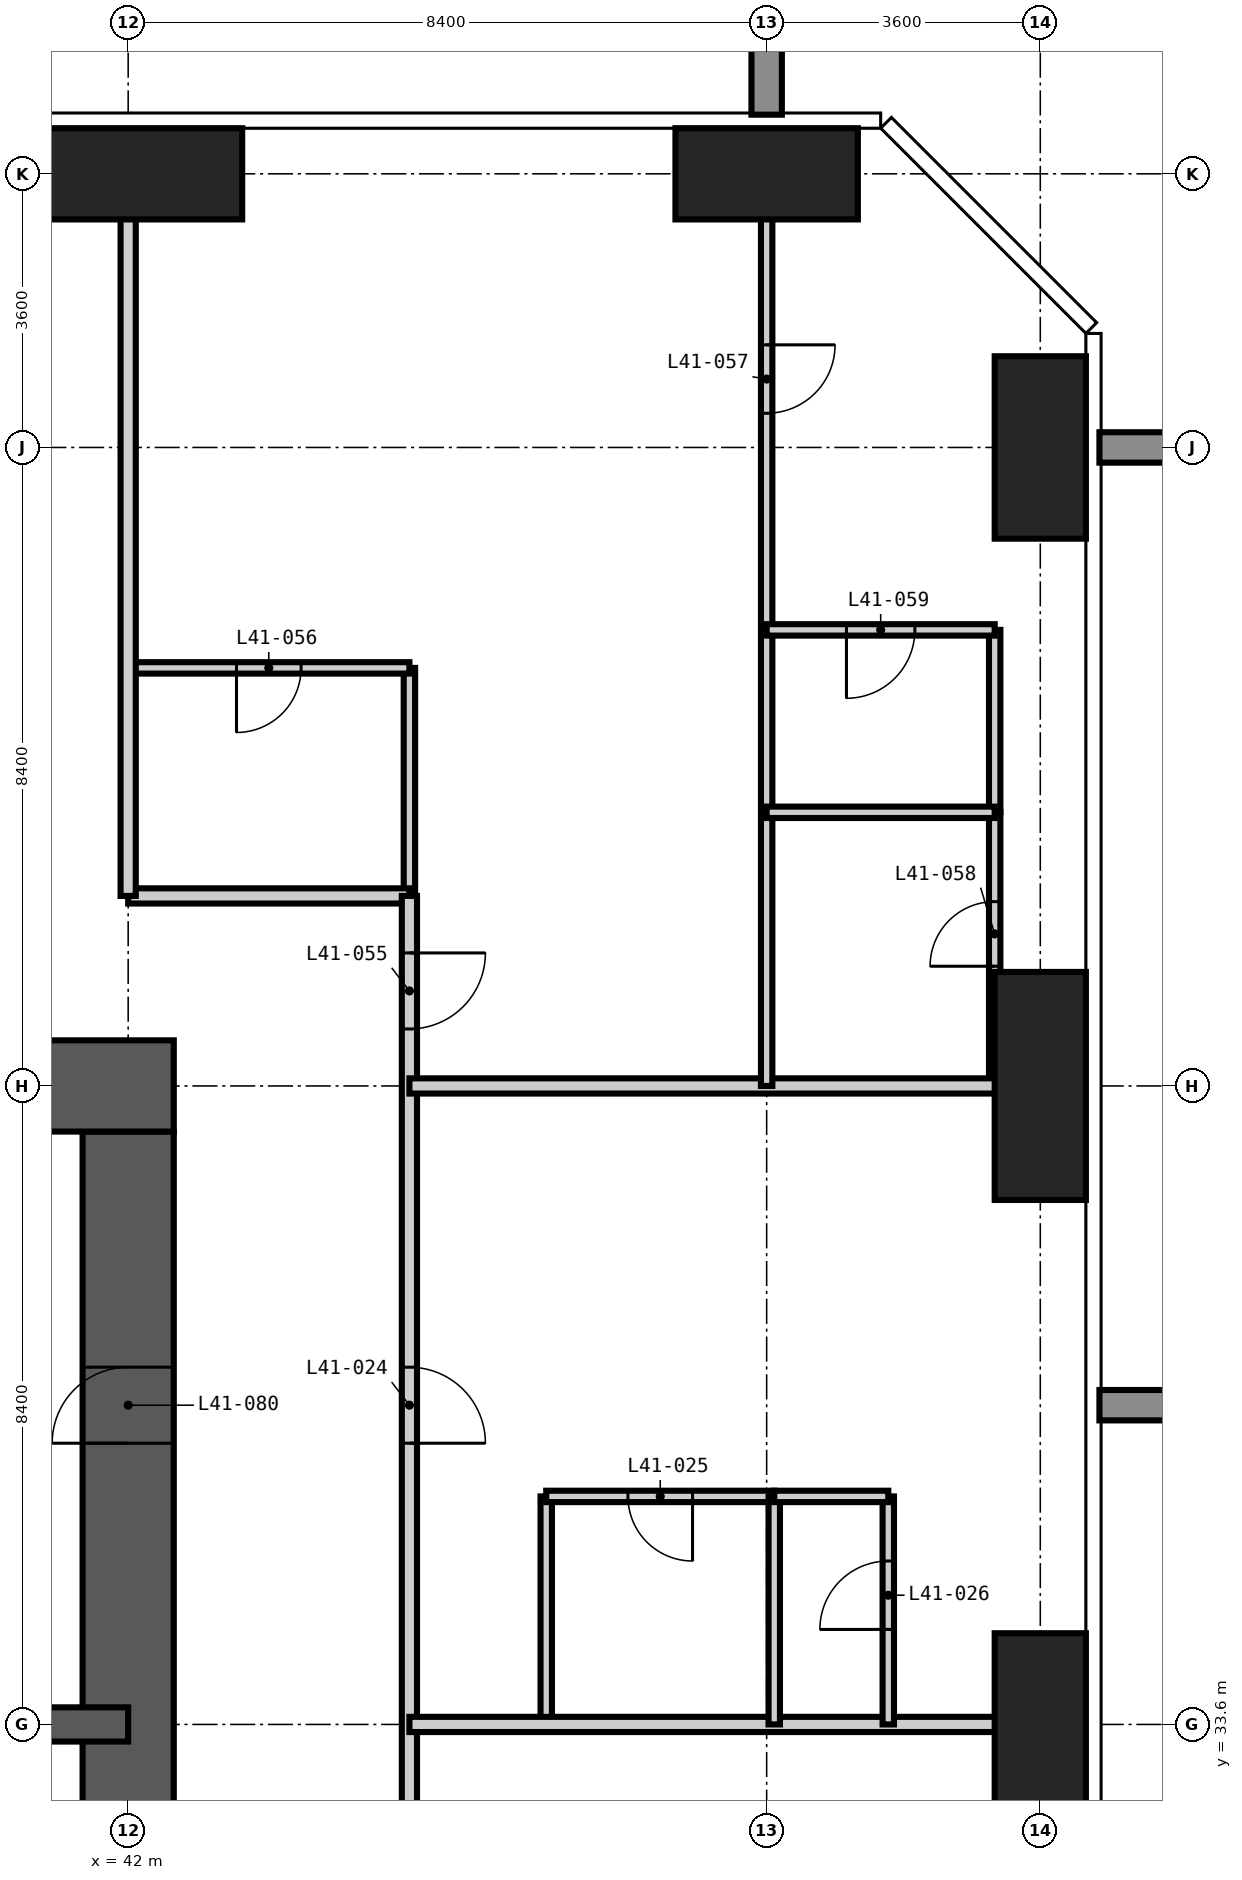
"""IFC4 building model, lengths in metres.
Left out: names, types, materials, properties, quantities, classifications, styles, units other than length and angle.
Written with IfcOpenShell. Run it as: python <this file> out.ifc"""

import sys

from ifc_helpers import new_model, si_unit, direction, frame, frame_2d, origin, origin_2d, place, context, subcontext, project, spatial, rectangle, extrude, element, fill, save


model = new_model("IFC4")
c1 = context("Model", 3, precision=1e-05, world=origin(), true_north=direction((0.0, 1.0)))
c2 = subcontext(c1, "Body", "Model", "MODEL_VIEW")
j1 = project(units=[si_unit("LENGTHUNIT", "METRE"), si_unit("PLANEANGLEUNIT", "RADIAN")], contexts=[c1])
p1 = place(None, origin())
s1 = spatial("IfcSite", under=j1, at=p1, CompositionType="ELEMENT")
p2 = place(p1, origin())
s2 = spatial("IfcBuilding", under=s1, at=p2, CompositionType="ELEMENT")
p3 = place(p2, frame((0.0, 0.0, 162.6)))
s3 = spatial("IfcBuildingStorey", under=s2, at=p3, CompositionType="ELEMENT", Elevation=162.6)
p4 = place(p3, frame((42.0, 54.0, -0.35), z_axis=(0.0, 0.0, 1.0), x_axis=(1.0, 0.0, 0.0)))
e1 = element("IfcColumn", 1, at=p4, inside=s3, PredefinedType="COLUMN", context=c2, shape_type="SweptSolid", body=[
    extrude(rectangle(XDim=3.0, YDim=1.2, at=origin_2d()), origin(), (0.0, 0.0, 1.0), 3.6),
])
p5 = place(p3, frame((50.4, 54.0, -0.35), z_axis=(0.0, 0.0, 1.0), x_axis=(1.0, 0.0, 0.0)))
e2 = element("IfcColumn", 2, at=p5, inside=s3, PredefinedType="COLUMN", context=c2, shape_type="SweptSolid", body=[
    extrude(rectangle(XDim=2.4, YDim=1.2, at=origin_2d()), origin(), (0.0, 0.0, 1.0), 3.6),
])
p6 = place(p3, frame((54.0, 33.6, -0.35), z_axis=(0.0, 0.0, 1.0), x_axis=(1.0, 0.0, 0.0)))
e3 = element("IfcColumn", 3, at=p6, inside=s3, PredefinedType="COLUMN", context=c2, shape_type="SweptSolid", body=[
    extrude(rectangle(XDim=1.2, YDim=2.4, at=origin_2d()), origin(), (0.0, 0.0, 1.0), 3.6),
])
p7 = place(p3, frame((54.0, 42.0, -0.35), z_axis=(0.0, 0.0, 1.0), x_axis=(1.0, 0.0, 0.0)))
e4 = element("IfcColumn", 4, at=p7, inside=s3, PredefinedType="COLUMN", context=c2, shape_type="SweptSolid", body=[
    extrude(rectangle(XDim=1.2, YDim=3.0, at=origin_2d()), origin(), (0.0, 0.0, 1.0), 3.6),
])
p8 = place(p3, frame((54.0, 50.4, -0.35), z_axis=(0.0, 0.0, 1.0), x_axis=(1.0, 0.0, 0.0)))
e5 = element("IfcColumn", 5, at=p8, inside=s3, PredefinedType="COLUMN", context=c2, shape_type="SweptSolid", body=[
    extrude(rectangle(XDim=1.2, YDim=2.4, at=origin_2d()), origin(), (0.0, 0.0, 1.0), 3.6),
])
p9 = place(p3, frame((42.0, 17.4, -0.35), z_axis=(0.0, 0.0, 1.0), x_axis=(0.0, 1.0, 0.0)))
e6 = element("IfcWall", 6, at=p9, inside=s3, PredefinedType="SHEAR", context=c2, shape_type="SweptSolid", body=[
    extrude(rectangle(XDim=24.0, YDim=1.2, at=frame_2d((12.0, 0.0))), origin(), (0.0, 0.0, 1.0), 3.6),
])
p10 = place(p9, frame((0.2, 0.0, 0.35)))
e7 = element("IfcOpeningElement", 7, at=p10, cuts=e6, PredefinedType="OPENING", context=c2, shape_type="SweptSolid", body=[
    extrude(rectangle(XDim=1.2, YDim=2.2, at=frame_2d((0.6, 1.1))), frame((0.0, 0.61, 0.0), z_axis=(0.0, -1.0, 0.0), x_axis=(1.0, 0.0, 0.0)), (0.0, 0.0, 1.0), 1.22),
])
p11 = place(p9, frame((11.5, 0.0, 0.35)))
e8 = element("IfcOpeningElement", 8, at=p11, cuts=e6, PredefinedType="OPENING", context=c2, shape_type="SweptSolid", body=[
    extrude(rectangle(XDim=1.0, YDim=2.1, at=frame_2d((0.5, 1.05))), frame((0.0, 0.61, 0.0), z_axis=(0.0, -1.0, 0.0), x_axis=(1.0, 0.0, 0.0)), (0.0, 0.0, 1.0), 1.22),
])
p12 = place(p9, frame((19.9, 0.0, 0.35)))
e9 = element("IfcOpeningElement", 9, at=p12, cuts=e6, PredefinedType="OPENING", context=c2, shape_type="SweptSolid", body=[
    extrude(rectangle(XDim=1.0, YDim=2.1, at=frame_2d((0.5, 1.05))), frame((0.0, 0.61, 0.0), z_axis=(0.0, -1.0, 0.0), x_axis=(1.0, 0.0, 0.0)), (0.0, 0.0, 1.0), 1.22),
])
p13 = place(p3, frame((42.6, 42.0, -0.35), z_axis=(0.0, 0.0, 1.0), x_axis=(-1.0, 0.0, 0.0)))
e10 = element("IfcWall", 10, at=p13, inside=s3, PredefinedType="SHEAR", context=c2, shape_type="SweptSolid", body=[
    extrude(rectangle(XDim=26.4, YDim=1.2, at=frame_2d((13.2, 0.0))), origin(), (0.0, 0.0, 1.0), 3.6),
])
p14 = place(p13, frame((21.1, 0.0, 0.35)))
e11 = element("IfcOpeningElement", 11, at=p14, cuts=e10, PredefinedType="OPENING", context=c2, shape_type="SweptSolid", body=[
    extrude(rectangle(XDim=1.0, YDim=2.1, at=frame_2d((0.5, 1.05))), frame((0.0, 0.61, 0.0), z_axis=(0.0, -1.0, 0.0), x_axis=(1.0, 0.0, 0.0)), (0.0, 0.0, 1.0), 1.22),
])
p15 = place(p13, frame((10.5, 0.0, 0.35)))
e12 = element("IfcOpeningElement", 12, at=p15, cuts=e10, PredefinedType="OPENING", context=c2, shape_type="SweptSolid", body=[
    extrude(rectangle(XDim=1.2, YDim=2.2, at=frame_2d((0.6, 1.1))), frame((0.0, 0.61, 0.0), z_axis=(0.0, -1.0, 0.0), x_axis=(1.0, 0.0, 0.0)), (0.0, 0.0, 1.0), 1.22),
])
p16 = place(p3, frame((16.8, 33.6, -0.35), z_axis=(0.0, 0.0, 1.0), x_axis=(1.0, 0.0, 0.0)))
e13 = element("IfcWall", 13, at=p16, inside=s3, PredefinedType="SHEAR", context=c2, shape_type="SweptSolid", body=[
    extrude(rectangle(XDim=25.2, YDim=0.45, at=frame_2d((12.6, 0.0))), origin(), (0.0, 0.0, 1.0), 3.6),
])
for number, where, z_axis, x_axis in (
    (14, (45.7, 44.5, 0.0), (0.0, 0.0, 1.0), (0.0, 1.0, 0.0)),
    (15, (47.5, 33.6, 0.0), (0.0, 0.0, 1.0), (0.0, 1.0, 0.0)),
):
    element("IfcWall", number, at=place(p3, frame(where, z_axis=z_axis, x_axis=x_axis)), inside=s3, PredefinedType="PARTITIONING", context=c2, shape_type="SweptSolid", body=[
        extrude(rectangle(XDim=3.0, YDim=0.15, at=frame_2d((1.5, 0.0))), origin(), (0.0, 0.0, 1.0), 3.25),
    ])
p17 = place(p3, frame((53.4, 42.0, 0.0), z_axis=(0.0, 0.0, 1.0), x_axis=(0.0, 1.0, 0.0)))
e16 = element("IfcWall", 16, at=p17, inside=s3, PredefinedType="PARTITIONING", context=c2, shape_type="SweptSolid", body=[
    extrude(rectangle(XDim=3.6, YDim=0.15, at=frame_2d((1.8, 0.0))), origin(), (0.0, 0.0, 1.0), 3.25),
])
p18 = place(p17, frame((1.575, 0.0, 0.0)))
e17 = element("IfcOpeningElement", 17, at=p18, cuts=e16, PredefinedType="OPENING", context=c2, shape_type="SweptSolid", body=[
    extrude(rectangle(XDim=0.85, YDim=2.1, at=frame_2d((0.425, 1.05))), frame((0.0, 0.085, 0.0), z_axis=(0.0, -1.0, 0.0), x_axis=(1.0, 0.0, 0.0)), (0.0, 0.0, 1.0), 0.17),
])
p19 = place(p3, frame((47.5, 36.6, 0.0), z_axis=(0.0, 0.0, 1.0), x_axis=(1.0, 0.0, 0.0)))
e18 = element("IfcWall", 18, at=p19, inside=s3, PredefinedType="PARTITIONING", context=c2, shape_type="SweptSolid", body=[
    extrude(rectangle(XDim=3.0, YDim=0.15, at=frame_2d((1.5, 0.0))), origin(), (0.0, 0.0, 1.0), 3.25),
])
p20 = place(p19, frame((1.075, 0.0, 0.0)))
e19 = element("IfcOpeningElement", 19, at=p20, cuts=e18, PredefinedType="OPENING", context=c2, shape_type="SweptSolid", body=[
    extrude(rectangle(XDim=0.85, YDim=2.1, at=frame_2d((0.425, 1.05))), frame((0.0, 0.085, 0.0), z_axis=(0.0, -1.0, 0.0), x_axis=(1.0, 0.0, 0.0)), (0.0, 0.0, 1.0), 0.17),
])
p21 = place(p3, frame((42.0, 47.5, 0.0), z_axis=(0.0, 0.0, 1.0), x_axis=(1.0, 0.0, 0.0)))
e20 = element("IfcWall", 20, at=p21, inside=s3, PredefinedType="PARTITIONING", context=c2, shape_type="SweptSolid", body=[
    extrude(rectangle(XDim=3.7, YDim=0.15, at=frame_2d((1.85, 0.0))), origin(), (0.0, 0.0, 1.0), 3.25),
])
p22 = place(p21, frame((1.425, 0.0, 0.0)))
e21 = element("IfcOpeningElement", 21, at=p22, cuts=e20, PredefinedType="OPENING", context=c2, shape_type="SweptSolid", body=[
    extrude(rectangle(XDim=0.85, YDim=2.1, at=frame_2d((0.425, 1.05))), frame((0.0, 0.085, 0.0), z_axis=(0.0, -1.0, 0.0), x_axis=(1.0, 0.0, 0.0)), (0.0, 0.0, 1.0), 0.17),
])
p23 = place(p3, frame((42.0, 44.5, 0.0), z_axis=(0.0, 0.0, 1.0), x_axis=(1.0, 0.0, 0.0)))
e22 = element("IfcWall", 22, at=p23, inside=s3, PredefinedType="PARTITIONING", context=c2, shape_type="SweptSolid", body=[
    extrude(rectangle(XDim=3.7, YDim=0.2, at=frame_2d((1.85, 0.0))), origin(), (0.0, 0.0, 1.0), 3.25),
])
p24 = place(p3, frame((42.0, 54.618, 0.0), z_axis=(0.0, 0.0, 1.0), x_axis=(0.0, -1.0, 0.0)))
e23 = element("IfcWall", 23, at=p24, inside=s3, PredefinedType="PARTITIONING", context=c2, shape_type="SweptSolid", body=[
    extrude(rectangle(XDim=10.118, YDim=0.2, at=frame_2d((5.059, 0.0))), origin(), (0.0, 0.0, 1.0), 3.25),
])
p25 = place(p3, frame((45.7, 44.5, 0.0), z_axis=(0.0, 0.0, 1.0), x_axis=(0.0, -1.0, 0.0)))
e24 = element("IfcWall", 24, at=p25, inside=s3, PredefinedType="PARTITIONING", context=c2, shape_type="SweptSolid", body=[
    extrude(rectangle(XDim=30.8, YDim=0.2, at=frame_2d((15.4, 0.0))), origin(), (0.0, 0.0, 1.0), 3.25),
])
p26 = place(p25, frame((23.0, 0.0, 0.0)))
e25 = element("IfcOpeningElement", 25, at=p26, cuts=e24, PredefinedType="OPENING", context=c2, shape_type="SweptSolid", body=[
    extrude(rectangle(XDim=1.0, YDim=2.2, at=frame_2d((0.5, 1.1))), frame((0.0, 0.11, 0.0), z_axis=(0.0, -1.0, 0.0), x_axis=(1.0, 0.0, 0.0)), (0.0, 0.0, 1.0), 0.22),
])
p27 = place(p25, frame((14.6, 0.0, 0.0)))
e26 = element("IfcOpeningElement", 26, at=p27, cuts=e24, PredefinedType="OPENING", context=c2, shape_type="SweptSolid", body=[
    extrude(rectangle(XDim=1.0, YDim=2.2, at=frame_2d((0.5, 1.1))), frame((0.0, 0.11, 0.0), z_axis=(0.0, -1.0, 0.0), x_axis=(1.0, 0.0, 0.0)), (0.0, 0.0, 1.0), 0.22),
])
p28 = place(p25, frame((6.2, 0.0, 0.0)))
e27 = element("IfcOpeningElement", 27, at=p28, cuts=e24, PredefinedType="OPENING", context=c2, shape_type="SweptSolid", body=[
    extrude(rectangle(XDim=1.0, YDim=2.2, at=frame_2d((0.5, 1.1))), frame((0.0, 0.11, 0.0), z_axis=(0.0, -1.0, 0.0), x_axis=(1.0, 0.0, 0.0)), (0.0, 0.0, 1.0), 0.22),
])
p29 = place(p25, frame((28.75, 0.0, 0.0)))
e28 = element("IfcOpeningElement", 28, at=p29, cuts=e24, PredefinedType="OPENING", context=c2, shape_type="SweptSolid", body=[
    extrude(rectangle(XDim=1.0, YDim=2.2, at=frame_2d((0.5, 1.1))), frame((0.0, 0.11, 0.0), z_axis=(0.0, -1.0, 0.0), x_axis=(1.0, 0.0, 0.0)), (0.0, 0.0, 1.0), 0.22),
])
p30 = place(p25, frame((0.75, 0.0, 0.0)))
e29 = element("IfcOpeningElement", 29, at=p30, cuts=e24, PredefinedType="OPENING", context=c2, shape_type="SweptSolid", body=[
    extrude(rectangle(XDim=1.0, YDim=2.2, at=frame_2d((0.5, 1.1))), frame((0.0, 0.11, 0.0), z_axis=(0.0, -1.0, 0.0), x_axis=(1.0, 0.0, 0.0)), (0.0, 0.0, 1.0), 0.22),
])
for number, where, z_axis, x_axis in (
    (30, (45.7, 33.6, 0.0), (0.0, 0.0, 1.0), (1.0, 0.0, 0.0)),
    (31, (45.7, 42.0, 0.0), (0.0, 0.0, 1.0), (1.0, 0.0, 0.0)),
):
    element("IfcWall", number, at=place(p3, frame(where, z_axis=z_axis, x_axis=x_axis)), inside=s3, PredefinedType="PARTITIONING", context=c2, shape_type="SweptSolid", body=[
        extrude(rectangle(XDim=8.918, YDim=0.2, at=frame_2d((4.459, 0.0))), origin(), (0.0, 0.0, 1.0), 3.25),
    ])
p31 = place(p3, frame((50.4, 42.0, 0.0), z_axis=(0.0, 0.0, 1.0), x_axis=(0.0, 1.0, 0.0)))
e32 = element("IfcWall", 32, at=p31, inside=s3, PredefinedType="PARTITIONING", context=c2, shape_type="SweptSolid", body=[
    extrude(rectangle(XDim=12.618, YDim=0.15, at=frame_2d((6.309, 0.0))), origin(), (0.0, 0.0, 1.0), 3.25),
])
p32 = place(p31, frame((8.85, 0.0, 0.0)))
e33 = element("IfcOpeningElement", 33, at=p32, cuts=e32, PredefinedType="OPENING", context=c2, shape_type="SweptSolid", body=[
    extrude(rectangle(XDim=0.9, YDim=2.1, at=frame_2d((0.45, 1.05))), frame((0.0, 0.085, 0.0), z_axis=(0.0, -1.0, 0.0), x_axis=(1.0, 0.0, 0.0)), (0.0, 0.0, 1.0), 0.17),
])
p33 = place(p3, frame((50.5, 33.6, 0.0), z_axis=(0.0, 0.0, 1.0), x_axis=(0.0, 1.0, 0.0)))
e34 = element("IfcWall", 34, at=p33, inside=s3, PredefinedType="PARTITIONING", context=c2, shape_type="SweptSolid", body=[
    extrude(rectangle(XDim=3.0, YDim=0.15, at=frame_2d((1.5, 0.0))), origin(), (0.0, 0.0, 1.0), 3.25),
])
p34 = place(p3, frame((52.0, 33.6, 0.0), z_axis=(0.0, 0.0, 1.0), x_axis=(0.0, 1.0, 0.0)))
e35 = element("IfcWall", 35, at=p34, inside=s3, PredefinedType="PARTITIONING", context=c2, shape_type="SweptSolid", body=[
    extrude(rectangle(XDim=3.0, YDim=0.15, at=frame_2d((1.5, 0.0))), origin(), (0.0, 0.0, 1.0), 3.25),
])
p35 = place(p34, frame((1.25, 0.0, 0.0)))
e36 = element("IfcOpeningElement", 36, at=p35, cuts=e35, PredefinedType="OPENING", context=c2, shape_type="SweptSolid", body=[
    extrude(rectangle(XDim=0.9, YDim=2.1, at=frame_2d((0.45, 1.05))), frame((0.0, 0.085, 0.0), z_axis=(0.0, -1.0, 0.0), x_axis=(1.0, 0.0, 0.0)), (0.0, 0.0, 1.0), 0.17),
])
p36 = place(p3, frame((53.4, 45.6, 0.0), z_axis=(0.0, 0.0, 1.0), x_axis=(0.0, 1.0, 0.0)))
e37 = element("IfcWall", 37, at=p36, inside=s3, PredefinedType="PARTITIONING", context=c2, shape_type="SweptSolid", body=[
    extrude(rectangle(XDim=2.4, YDim=0.15, at=frame_2d((1.2, 0.0))), origin(), (0.0, 0.0, 1.0), 3.25),
])
p37 = place(p3, frame((50.5, 36.6, 0.0), z_axis=(0.0, 0.0, 1.0), x_axis=(1.0, 0.0, 0.0)))
e38 = element("IfcWall", 38, at=p37, inside=s3, PredefinedType="PARTITIONING", context=c2, shape_type="SweptSolid", body=[
    extrude(rectangle(XDim=1.5, YDim=0.15, at=frame_2d((0.75, 0.0))), origin(), (0.0, 0.0, 1.0), 3.25),
])
p38 = place(p3, frame((50.4, 45.6, 0.0), z_axis=(0.0, 0.0, 1.0), x_axis=(1.0, 0.0, 0.0)))
e39 = element("IfcWall", 39, at=p38, inside=s3, PredefinedType="PARTITIONING", context=c2, shape_type="SweptSolid", body=[
    extrude(rectangle(XDim=3.0, YDim=0.15, at=frame_2d((1.5, 0.0))), origin(), (0.0, 0.0, 1.0), 3.25),
])
p39 = place(p3, frame((50.4, 48.0, 0.0), z_axis=(0.0, 0.0, 1.0), x_axis=(1.0, 0.0, 0.0)))
e40 = element("IfcWall", 40, at=p39, inside=s3, PredefinedType="PARTITIONING", context=c2, shape_type="SweptSolid", body=[
    extrude(rectangle(XDim=3.0, YDim=0.15, at=frame_2d((1.5, 0.0))), origin(), (0.0, 0.0, 1.0), 3.25),
])
p40 = place(p39, frame((1.05, 0.0, 0.0)))
e41 = element("IfcOpeningElement", 41, at=p40, cuts=e40, PredefinedType="OPENING", context=c2, shape_type="SweptSolid", body=[
    extrude(rectangle(XDim=0.9, YDim=2.1, at=frame_2d((0.45, 1.05))), frame((0.0, 0.085, 0.0), z_axis=(0.0, -1.0, 0.0), x_axis=(1.0, 0.0, 0.0)), (0.0, 0.0, 1.0), 0.17),
])
p41 = place(p28, origin())
e42 = element("IfcDoor", 42, at=p41, inside=s3, OperationType="SINGLE_SWING_RIGHT", PredefinedType="DOOR", context=c2, shape_type="SweptSolid", body=[
    extrude(rectangle(XDim=1.0, YDim=2.2, at=frame_2d((0.5, 1.1))), frame((0.0, 0.025, 0.0), z_axis=(0.0, -1.0, 0.0), x_axis=(1.0, 0.0, 0.0)), (0.0, 0.0, 1.0), 0.05),
])
fill(e27, e42)
p42 = place(p20, frame((0.85, 0.0, 0.0), z_axis=(0.0, 0.0, 1.0), x_axis=(-1.0, 0.0, 0.0)))
e43 = element("IfcDoor", 43, at=p42, inside=s3, OperationType="SINGLE_SWING_LEFT", PredefinedType="DOOR", context=c2, shape_type="SweptSolid", body=[
    extrude(rectangle(XDim=0.85, YDim=2.1, at=frame_2d((0.425, 1.05))), frame((0.0, 0.025, 0.0), z_axis=(0.0, -1.0, 0.0), x_axis=(1.0, 0.0, 0.0)), (0.0, 0.0, 1.0), 0.05),
])
fill(e19, e43)
p43 = place(p35, origin())
e44 = element("IfcDoor", 44, at=p43, inside=s3, OperationType="SINGLE_SWING_LEFT", PredefinedType="DOOR", context=c2, shape_type="SweptSolid", body=[
    extrude(rectangle(XDim=0.9, YDim=2.1, at=frame_2d((0.45, 1.05))), frame((0.0, 0.025, 0.0), z_axis=(0.0, -1.0, 0.0), x_axis=(1.0, 0.0, 0.0)), (0.0, 0.0, 1.0), 0.05),
])
fill(e36, e44)
p44 = place(p30, origin())
e45 = element("IfcDoor", 45, at=p44, inside=s3, OperationType="SINGLE_SWING_LEFT", PredefinedType="DOOR", context=c2, shape_type="SweptSolid", body=[
    extrude(rectangle(XDim=1.0, YDim=2.2, at=frame_2d((0.5, 1.1))), frame((0.0, 0.025, 0.0), z_axis=(0.0, -1.0, 0.0), x_axis=(1.0, 0.0, 0.0)), (0.0, 0.0, 1.0), 0.05),
])
fill(e29, e45)
p45 = place(p22, frame((0.85, 0.0, 0.0), z_axis=(0.0, 0.0, 1.0), x_axis=(-1.0, 0.0, 0.0)))
e46 = element("IfcDoor", 46, at=p45, inside=s3, OperationType="SINGLE_SWING_RIGHT", PredefinedType="DOOR", context=c2, shape_type="SweptSolid", body=[
    extrude(rectangle(XDim=0.85, YDim=2.1, at=frame_2d((0.425, 1.05))), frame((0.0, 0.025, 0.0), z_axis=(0.0, -1.0, 0.0), x_axis=(1.0, 0.0, 0.0)), (0.0, 0.0, 1.0), 0.05),
])
fill(e21, e46)
p46 = place(p32, frame((0.9, 0.0, 0.0), z_axis=(0.0, 0.0, 1.0), x_axis=(-1.0, 0.0, 0.0)))
e47 = element("IfcDoor", 47, at=p46, inside=s3, OperationType="SINGLE_SWING_LEFT", PredefinedType="DOOR", context=c2, shape_type="SweptSolid", body=[
    extrude(rectangle(XDim=0.9, YDim=2.1, at=frame_2d((0.45, 1.05))), frame((0.0, 0.025, 0.0), z_axis=(0.0, -1.0, 0.0), x_axis=(1.0, 0.0, 0.0)), (0.0, 0.0, 1.0), 0.05),
])
fill(e33, e47)
p47 = place(p18, origin())
e48 = element("IfcDoor", 48, at=p47, inside=s3, OperationType="SINGLE_SWING_LEFT", PredefinedType="DOOR", context=c2, shape_type="SweptSolid", body=[
    extrude(rectangle(XDim=0.85, YDim=2.1, at=frame_2d((0.425, 1.05))), frame((0.0, 0.025, 0.0), z_axis=(0.0, -1.0, 0.0), x_axis=(1.0, 0.0, 0.0)), (0.0, 0.0, 1.0), 0.05),
])
fill(e17, e48)
p48 = place(p40, frame((0.9, 0.0, 0.0), z_axis=(0.0, 0.0, 1.0), x_axis=(-1.0, 0.0, 0.0)))
e49 = element("IfcDoor", 49, at=p48, inside=s3, OperationType="SINGLE_SWING_RIGHT", PredefinedType="DOOR", context=c2, shape_type="SweptSolid", body=[
    extrude(rectangle(XDim=0.9, YDim=2.1, at=frame_2d((0.45, 1.05))), frame((0.0, 0.025, 0.0), z_axis=(0.0, -1.0, 0.0), x_axis=(1.0, 0.0, 0.0)), (0.0, 0.0, 1.0), 0.05),
])
fill(e41, e49)
p49 = place(p12, origin())
e50 = element("IfcDoor", 50, at=p49, inside=s3, OperationType="SINGLE_SWING_LEFT", PredefinedType="DOOR", context=c2, shape_type="SweptSolid", body=[
    extrude(rectangle(XDim=1.0, YDim=2.1, at=frame_2d((0.5, 1.05))), frame((0.0, 0.025, 0.0), z_axis=(0.0, -1.0, 0.0), x_axis=(1.0, 0.0, 0.0)), (0.0, 0.0, 1.0), 0.05),
])
fill(e9, e50)
save(model, sys.argv[1])
